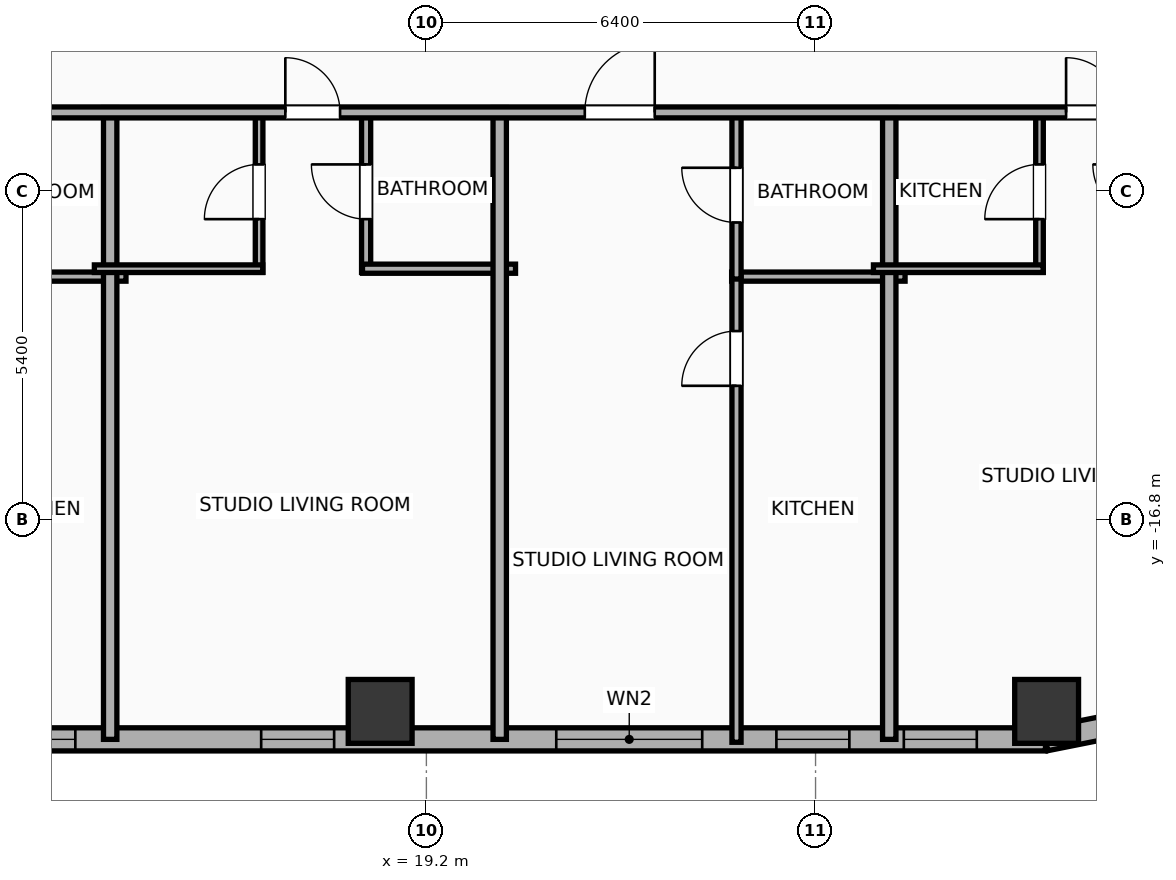
"""IFC4 building model, lengths in metres.
Left out: names, types, materials, properties, quantities, classifications, styles, units other than length and angle.
Written with IfcOpenShell. Run it as: python <this file> out.ifc"""

import sys

from ifc_helpers import new_model, si_unit, direction, frame, frame_2d, origin, origin_2d, place, context, subcontext, project, spatial, rectangle, hollow_rectangle, extrude, element, fill, save


model = new_model("IFC4")
c1 = context("Model", 3, precision=1e-05, world=origin(), true_north=direction((0.0, 1.0)))
c2 = subcontext(c1, "Body", "Model", "MODEL_VIEW")
j1 = project(units=[si_unit("LENGTHUNIT", "METRE"), si_unit("PLANEANGLEUNIT", "RADIAN")], contexts=[c1])
p1 = place(None, origin())
s1 = spatial("IfcSite", under=j1, at=p1, CompositionType="ELEMENT")
p2 = place(p1, origin())
s2 = spatial("IfcBuilding", under=s1, at=p2, CompositionType="ELEMENT")
p3 = place(p2, frame((0.0, 0.0, 124.8)))
s3 = spatial("IfcBuildingStorey", under=s2, at=p3, CompositionType="ELEMENT", Elevation=124.8)
for number, where, z_axis, x_axis in (
    (1, (18.44, -19.95, 0.0), (0.0, 0.0, 1.0), (1.0, 0.0, 0.0)),
    (2, (29.4, -19.95, 0.0), (0.0, 0.0, 1.0), (1.0, 0.0, 0.0)),
):
    element("IfcColumn", number, at=place(p3, frame(where, z_axis=z_axis, x_axis=x_axis)), inside=s3, PredefinedType="COLUMN", context=c2, shape_type="SweptSolid", body=[
        extrude(hollow_rectangle(XDim=1.05, YDim=1.05, WallThickness=0.036, at=origin_2d()), origin(), (0.0, 0.0, 1.0), 3.9),
    ])
p4 = place(p3, frame((29.381, -20.41, 0.0), z_axis=(0.0, 0.0, 1.0), x_axis=(-1.0, 0.0, 0.0)))
e3 = element("IfcWall", 3, at=p4, inside=s3, PredefinedType="ELEMENTEDWALL", context=c2, shape_type="SweptSolid", body=[
    extrude(rectangle(XDim=54.763, YDim=0.38, at=frame_2d((27.381, 0.0))), origin(), (0.0, 0.0, 1.0), 3.65),
])
p5 = place(p4, frame((5.645, 0.0, 0.75)))
e4 = element("IfcOpeningElement", 4, at=p5, cuts=e3, PredefinedType="OPENING", context=c2, shape_type="SweptSolid", body=[
    extrude(rectangle(XDim=2.4, YDim=2.1, at=frame_2d((1.2, 1.05))), frame((0.0, 0.2, 0.0), z_axis=(0.0, -1.0, 0.0), x_axis=(1.0, 0.0, 0.0)), (0.0, 0.0, 1.0), 0.4),
])
p6 = place(p4, frame((18.486, 0.0, 0.75)))
e5 = element("IfcOpeningElement", 5, at=p6, cuts=e3, PredefinedType="OPENING", context=c2, shape_type="SweptSolid", body=[
    extrude(rectangle(XDim=2.4, YDim=2.1, at=frame_2d((1.2, 1.05))), frame((0.0, 0.2, 0.0), z_axis=(0.0, -1.0, 0.0), x_axis=(1.0, 0.0, 0.0)), (0.0, 0.0, 1.0), 0.4),
])
p7 = place(p4, frame((34.677, 0.0, 0.75)))
e6 = element("IfcOpeningElement", 6, at=p7, cuts=e3, PredefinedType="OPENING", context=c2, shape_type="SweptSolid", body=[
    extrude(rectangle(XDim=2.4, YDim=2.1, at=frame_2d((1.2, 1.05))), frame((0.0, 0.2, 0.0), z_axis=(0.0, -1.0, 0.0), x_axis=(1.0, 0.0, 0.0)), (0.0, 0.0, 1.0), 0.4),
])
p8 = place(p4, frame((46.717, 0.0, 0.75)))
e7 = element("IfcOpeningElement", 7, at=p8, cuts=e3, PredefinedType="OPENING", context=c2, shape_type="SweptSolid", body=[
    extrude(rectangle(XDim=2.4, YDim=2.1, at=frame_2d((1.2, 1.05))), frame((0.0, 0.2, 0.0), z_axis=(0.0, -1.0, 0.0), x_axis=(1.0, 0.0, 0.0)), (0.0, 0.0, 1.0), 0.4),
])
p9 = place(p4, frame((52.719, 0.0, 0.75)))
e8 = element("IfcOpeningElement", 8, at=p9, cuts=e3, PredefinedType="OPENING", context=c2, shape_type="SweptSolid", body=[
    extrude(rectangle(XDim=1.2, YDim=2.05, at=frame_2d((0.6, 1.025))), frame((0.0, 0.2, 0.0), z_axis=(0.0, -1.0, 0.0), x_axis=(1.0, 0.0, 0.0)), (0.0, 0.0, 1.0), 0.4),
])
p10 = place(p4, frame((50.786, 0.0, 0.75)))
e9 = element("IfcOpeningElement", 9, at=p10, cuts=e3, PredefinedType="OPENING", context=c2, shape_type="SweptSolid", body=[
    extrude(rectangle(XDim=1.2, YDim=2.05, at=frame_2d((0.6, 1.025))), frame((0.0, 0.2, 0.0), z_axis=(0.0, -1.0, 0.0), x_axis=(1.0, 0.0, 0.0)), (0.0, 0.0, 1.0), 0.4),
])
p11 = place(p4, frame((41.858, 0.0, 0.75)))
e10 = element("IfcOpeningElement", 10, at=p11, cuts=e3, PredefinedType="OPENING", context=c2, shape_type="SweptSolid", body=[
    extrude(rectangle(XDim=1.2, YDim=2.05, at=frame_2d((0.6, 1.025))), frame((0.0, 0.2, 0.0), z_axis=(0.0, -1.0, 0.0), x_axis=(1.0, 0.0, 0.0)), (0.0, 0.0, 1.0), 0.4),
])
p12 = place(p4, frame((38.556, 0.0, 0.75)))
e11 = element("IfcOpeningElement", 11, at=p12, cuts=e3, PredefinedType="OPENING", context=c2, shape_type="SweptSolid", body=[
    extrude(rectangle(XDim=1.2, YDim=2.05, at=frame_2d((0.6, 1.025))), frame((0.0, 0.2, 0.0), z_axis=(0.0, -1.0, 0.0), x_axis=(1.0, 0.0, 0.0)), (0.0, 0.0, 1.0), 0.4),
])
p13 = place(p4, frame((30.406, 0.0, 0.75)))
e12 = element("IfcOpeningElement", 12, at=p13, cuts=e3, PredefinedType="OPENING", context=c2, shape_type="SweptSolid", body=[
    extrude(rectangle(XDim=1.2, YDim=2.05, at=frame_2d((0.6, 1.025))), frame((0.0, 0.2, 0.0), z_axis=(0.0, -1.0, 0.0), x_axis=(1.0, 0.0, 0.0)), (0.0, 0.0, 1.0), 0.4),
])
p14 = place(p4, frame((25.434, 0.0, 0.75)))
e13 = element("IfcOpeningElement", 13, at=p14, cuts=e3, PredefinedType="OPENING", context=c2, shape_type="SweptSolid", body=[
    extrude(rectangle(XDim=1.2, YDim=2.05, at=frame_2d((0.6, 1.025))), frame((0.0, 0.2, 0.0), z_axis=(0.0, -1.0, 0.0), x_axis=(1.0, 0.0, 0.0)), (0.0, 0.0, 1.0), 0.4),
])
p15 = place(p4, frame((22.669, 0.0, 0.75)))
e14 = element("IfcOpeningElement", 14, at=p15, cuts=e3, PredefinedType="OPENING", context=c2, shape_type="SweptSolid", body=[
    extrude(rectangle(XDim=1.2, YDim=2.05, at=frame_2d((0.6, 1.025))), frame((0.0, 0.2, 0.0), z_axis=(0.0, -1.0, 0.0), x_axis=(1.0, 0.0, 0.0)), (0.0, 0.0, 1.0), 0.4),
])
p16 = place(p4, frame((15.954, 0.0, 0.75)))
e15 = element("IfcOpeningElement", 15, at=p16, cuts=e3, PredefinedType="OPENING", context=c2, shape_type="SweptSolid", body=[
    extrude(rectangle(XDim=1.2, YDim=2.05, at=frame_2d((0.6, 1.025))), frame((0.0, 0.2, 0.0), z_axis=(0.0, -1.0, 0.0), x_axis=(1.0, 0.0, 0.0)), (0.0, 0.0, 1.0), 0.4),
])
p17 = place(p4, frame((11.698, 0.0, 0.75)))
e16 = element("IfcOpeningElement", 16, at=p17, cuts=e3, PredefinedType="OPENING", context=c2, shape_type="SweptSolid", body=[
    extrude(rectangle(XDim=1.2, YDim=2.05, at=frame_2d((0.6, 1.025))), frame((0.0, 0.2, 0.0), z_axis=(0.0, -1.0, 0.0), x_axis=(1.0, 0.0, 0.0)), (0.0, 0.0, 1.0), 0.4),
])
p18 = place(p4, frame((3.225, 0.0, 0.75)))
e17 = element("IfcOpeningElement", 17, at=p18, cuts=e3, PredefinedType="OPENING", context=c2, shape_type="SweptSolid", body=[
    extrude(rectangle(XDim=1.2, YDim=2.05, at=frame_2d((0.6, 1.025))), frame((0.0, 0.2, 0.0), z_axis=(0.0, -1.0, 0.0), x_axis=(1.0, 0.0, 0.0)), (0.0, 0.0, 1.0), 0.4),
])
p19 = place(p4, frame((1.13, 0.0, 0.75)))
e18 = element("IfcOpeningElement", 18, at=p19, cuts=e3, PredefinedType="OPENING", context=c2, shape_type="SweptSolid", body=[
    extrude(rectangle(XDim=1.2, YDim=2.05, at=frame_2d((0.6, 1.025))), frame((0.0, 0.2, 0.0), z_axis=(0.0, -1.0, 0.0), x_axis=(1.0, 0.0, 0.0)), (0.0, 0.0, 1.0), 0.4),
])
p20 = place(p3, frame((30.857, -20.116, 0.0), z_axis=(0.0, 0.0, 1.0), x_axis=(-0.980786132421, -0.195086038585, 0.0)))
e19 = element("IfcWall", 19, at=p20, inside=s3, PredefinedType="ELEMENTEDWALL", context=c2, shape_type="SweptSolid", body=[
    extrude(rectangle(XDim=1.504, YDim=0.38, at=frame_2d((0.752, 0.0))), origin(), (0.0, 0.0, 1.0), 3.65),
])
p21 = place(p3, frame((11.574, -12.8, 0.0), z_axis=(0.0, 0.0, 1.0), x_axis=(1.0, 0.0, 0.0)))
e20 = element("IfcWall", 20, at=p21, inside=s3, PredefinedType="PLUMBINGWALL", context=c2, shape_type="SweptSolid", body=[
    extrude(rectangle(XDim=2.686, YDim=0.15, at=frame_2d((1.343, 0.0))), origin(), (0.0, 0.0, 1.0), 3.65),
])
p22 = place(p3, frame((14.0, -20.41, 0.0), z_axis=(0.0, 0.0, 1.0), x_axis=(0.0, 1.0, 0.0)))
e21 = element("IfcWall", 21, at=p22, inside=s3, PredefinedType="PARTITIONING", context=c2, shape_type="SweptSolid", body=[
    extrude(rectangle(XDim=10.39, YDim=0.22, at=frame_2d((5.195, 0.0))), origin(), (0.0, 0.0, 1.0), 3.65),
])
p23 = place(p3, frame((16.449, -12.73, 0.0), z_axis=(0.0, 0.0, 1.0), x_axis=(0.0, 1.0, 0.0)))
e22 = element("IfcWall", 22, at=p23, inside=s3, PredefinedType="PARTITIONING", context=c2, shape_type="SweptSolid", body=[
    extrude(rectangle(XDim=2.65, YDim=0.125, at=frame_2d((1.325, 0.0))), origin(), (0.0, 0.0, 1.0), 3.65),
])
p24 = place(p23, frame((0.875, 0.0, 0.0)))
e23 = element("IfcOpeningElement", 23, at=p24, cuts=e22, PredefinedType="OPENING", context=c2, shape_type="SweptSolid", body=[
    extrude(rectangle(XDim=0.9, YDim=2.05, at=frame_2d((0.45, 1.025))), frame((0.0, 0.073, 0.0), z_axis=(0.0, -1.0, 0.0), x_axis=(1.0, 0.0, 0.0)), (0.0, 0.0, 1.0), 0.145),
])
p25 = place(p3, frame((18.209, -12.73, 0.0), z_axis=(0.0, 0.0, 1.0), x_axis=(0.0, 1.0, 0.0)))
e24 = element("IfcWall", 24, at=p25, inside=s3, PredefinedType="PLUMBINGWALL", context=c2, shape_type="SweptSolid", body=[
    extrude(rectangle(XDim=2.65, YDim=0.15, at=frame_2d((1.325, 0.0))), origin(), (0.0, 0.0, 1.0), 3.65),
])
p26 = place(p25, frame((0.875, 0.0, 0.0)))
e25 = element("IfcOpeningElement", 25, at=p26, cuts=e24, PredefinedType="OPENING", context=c2, shape_type="SweptSolid", body=[
    extrude(rectangle(XDim=0.9, YDim=2.05, at=frame_2d((0.45, 1.025))), frame((0.0, 0.085, 0.0), z_axis=(0.0, -1.0, 0.0), x_axis=(1.0, 0.0, 0.0)), (0.0, 0.0, 1.0), 0.17),
])
p27 = place(p3, frame((13.74, -12.67, 0.0), z_axis=(0.0, 0.0, 1.0), x_axis=(1.0, 0.0, 0.0)))
e26 = element("IfcWall", 26, at=p27, inside=s3, PredefinedType="PARTITIONING", context=c2, shape_type="SweptSolid", body=[
    extrude(rectangle(XDim=2.769, YDim=0.125, at=frame_2d((1.385, 0.0))), origin(), (0.0, 0.0, 1.0), 3.65),
])
p28 = place(p3, frame((18.149, -12.67, 0.0), z_axis=(0.0, 0.0, 1.0), x_axis=(1.0, 0.0, 0.0)))
e27 = element("IfcWall", 27, at=p28, inside=s3, PredefinedType="PLUMBINGWALL", context=c2, shape_type="SweptSolid", body=[
    extrude(rectangle(XDim=2.517, YDim=0.15, at=frame_2d((1.259, 0.0))), origin(), (0.0, 0.0, 1.0), 3.65),
])
p29 = place(p3, frame((20.406, -20.41, 0.0), z_axis=(0.0, 0.0, 1.0), x_axis=(0.0, 1.0, 0.0)))
e28 = element("IfcWall", 28, at=p29, inside=s3, PredefinedType="PARTITIONING", context=c2, shape_type="SweptSolid", body=[
    extrude(rectangle(XDim=10.39, YDim=0.22, at=frame_2d((5.195, 0.0))), origin(), (0.0, 0.0, 1.0), 3.65),
])
p30 = place(p3, frame((24.22, -12.8, 0.0), z_axis=(0.0, 0.0, 1.0), x_axis=(1.0, 0.0, 0.0)))
e29 = element("IfcWall", 29, at=p30, inside=s3, PredefinedType="PLUMBINGWALL", context=c2, shape_type="SweptSolid", body=[
    extrude(rectangle(XDim=2.852, YDim=0.15, at=frame_2d((1.426, 0.0))), origin(), (0.0, 0.0, 1.0), 3.65),
])
p31 = place(p3, frame((24.3, -20.458, 0.0), z_axis=(0.0, 0.0, 1.0), x_axis=(0.0, 1.0, 0.0)))
e30 = element("IfcWall", 30, at=p31, inside=s3, PredefinedType="PLUMBINGWALL", context=c2, shape_type="SweptSolid", body=[
    extrude(rectangle(XDim=7.698, YDim=0.15, at=frame_2d((3.849, 0.0))), origin(), (0.0, 0.0, 1.0), 3.65),
])
p32 = place(p31, frame((5.862, 0.0, 0.0)))
e31 = element("IfcOpeningElement", 31, at=p32, cuts=e30, PredefinedType="OPENING", context=c2, shape_type="SweptSolid", body=[
    extrude(rectangle(XDim=0.9, YDim=2.05, at=frame_2d((0.45, 1.025))), frame((0.0, 0.085, 0.0), z_axis=(0.0, -1.0, 0.0), x_axis=(1.0, 0.0, 0.0)), (0.0, 0.0, 1.0), 0.17),
])
p33 = place(p3, frame((24.3, -12.84, 0.0), z_axis=(0.0, 0.0, 1.0), x_axis=(0.0, 1.0, 0.0)))
e32 = element("IfcWall", 32, at=p33, inside=s3, PredefinedType="PLUMBINGWALL", context=c2, shape_type="SweptSolid", body=[
    extrude(rectangle(XDim=2.76, YDim=0.15, at=frame_2d((1.38, 0.0))), origin(), (0.0, 0.0, 1.0), 3.65),
])
p34 = place(p33, frame((0.93, 0.0, 0.0)))
e33 = element("IfcOpeningElement", 33, at=p34, cuts=e32, PredefinedType="OPENING", context=c2, shape_type="SweptSolid", body=[
    extrude(rectangle(XDim=0.9, YDim=2.05, at=frame_2d((0.45, 1.025))), frame((0.0, 0.085, 0.0), z_axis=(0.0, -1.0, 0.0), x_axis=(1.0, 0.0, 0.0)), (0.0, 0.0, 1.0), 0.17),
])
p35 = place(p3, frame((26.812, -20.41, 0.0), z_axis=(0.0, 0.0, 1.0), x_axis=(0.0, 1.0, 0.0)))
e34 = element("IfcWall", 34, at=p35, inside=s3, PredefinedType="PARTITIONING", context=c2, shape_type="SweptSolid", body=[
    extrude(rectangle(XDim=10.39, YDim=0.22, at=frame_2d((5.195, 0.0))), origin(), (0.0, 0.0, 1.0), 3.65),
])
p36 = place(p3, frame((29.283, -12.73, 0.0), z_axis=(0.0, 0.0, 1.0), x_axis=(0.0, 1.0, 0.0)))
e35 = element("IfcWall", 35, at=p36, inside=s3, PredefinedType="PARTITIONING", context=c2, shape_type="SweptSolid", body=[
    extrude(rectangle(XDim=2.65, YDim=0.125, at=frame_2d((1.325, 0.0))), origin(), (0.0, 0.0, 1.0), 3.65),
])
p37 = place(p36, frame((0.875, 0.0, 0.0)))
e36 = element("IfcOpeningElement", 36, at=p37, cuts=e35, PredefinedType="OPENING", context=c2, shape_type="SweptSolid", body=[
    extrude(rectangle(XDim=0.9, YDim=2.05, at=frame_2d((0.45, 1.025))), frame((0.0, 0.073, 0.0), z_axis=(0.0, -1.0, 0.0), x_axis=(1.0, 0.0, 0.0)), (0.0, 0.0, 1.0), 0.145),
])
p38 = place(p3, frame((26.552, -12.67, 0.0), z_axis=(0.0, 0.0, 1.0), x_axis=(1.0, 0.0, 0.0)))
e37 = element("IfcWall", 37, at=p38, inside=s3, PredefinedType="PARTITIONING", context=c2, shape_type="SweptSolid", body=[
    extrude(rectangle(XDim=2.791, YDim=0.125, at=frame_2d((1.396, 0.0))), origin(), (0.0, 0.0, 1.0), 3.65),
])
p39 = place(p3, frame((-29.21, -10.1, 0.0), z_axis=(0.0, 0.0, 1.0), x_axis=(1.0, 0.0, 0.0)))
e38 = element("IfcWall", 38, at=p39, inside=s3, PredefinedType="PARTITIONING", context=c2, shape_type="SweptSolid", body=[
    extrude(rectangle(XDim=62.42, YDim=0.18, at=frame_2d((31.21, 0.0))), origin(), (0.0, 0.0, 1.0), 3.65),
])
p40 = place(p39, frame((2.671, 0.0, 0.0)))
e39 = element("IfcOpeningElement", 39, at=p40, cuts=e38, PredefinedType="OPENING", context=c2, shape_type="SweptSolid", body=[
    extrude(rectangle(XDim=0.9, YDim=2.05, at=frame_2d((0.45, 1.025))), frame((0.0, 0.1, 0.0), z_axis=(0.0, -1.0, 0.0), x_axis=(1.0, 0.0, 0.0)), (0.0, 0.0, 1.0), 0.2),
])
p41 = place(p39, frame((9.637, 0.0, 0.0)))
e40 = element("IfcOpeningElement", 40, at=p41, cuts=e38, PredefinedType="OPENING", context=c2, shape_type="SweptSolid", body=[
    extrude(rectangle(XDim=1.15, YDim=2.05, at=frame_2d((0.575, 1.025))), frame((0.0, 0.1, 0.0), z_axis=(0.0, -1.0, 0.0), x_axis=(1.0, 0.0, 0.0)), (0.0, 0.0, 1.0), 0.2),
])
p42 = place(p39, frame((14.843, 0.0, 0.0)))
e41 = element("IfcOpeningElement", 41, at=p42, cuts=e38, PredefinedType="OPENING", context=c2, shape_type="SweptSolid", body=[
    extrude(rectangle(XDim=0.9, YDim=2.05, at=frame_2d((0.45, 1.025))), frame((0.0, 0.1, 0.0), z_axis=(0.0, -1.0, 0.0), x_axis=(1.0, 0.0, 0.0)), (0.0, 0.0, 1.0), 0.2),
])
p43 = place(p39, frame((21.958, 0.0, 0.0)))
e42 = element("IfcOpeningElement", 42, at=p43, cuts=e38, PredefinedType="OPENING", context=c2, shape_type="SweptSolid", body=[
    extrude(rectangle(XDim=1.15, YDim=2.05, at=frame_2d((0.575, 1.025))), frame((0.0, 0.1, 0.0), z_axis=(0.0, -1.0, 0.0), x_axis=(1.0, 0.0, 0.0)), (0.0, 0.0, 1.0), 0.2),
])
p44 = place(p39, frame((27.258, 0.0, 0.0)))
e43 = element("IfcOpeningElement", 43, at=p44, cuts=e38, PredefinedType="OPENING", context=c2, shape_type="SweptSolid", body=[
    extrude(rectangle(XDim=0.9, YDim=2.05, at=frame_2d((0.45, 1.025))), frame((0.0, 0.1, 0.0), z_axis=(0.0, -1.0, 0.0), x_axis=(1.0, 0.0, 0.0)), (0.0, 0.0, 1.0), 0.2),
])
p45 = place(p39, frame((32.014, 0.0, 0.0)))
e44 = element("IfcOpeningElement", 44, at=p45, cuts=e38, PredefinedType="OPENING", context=c2, shape_type="SweptSolid", body=[
    extrude(rectangle(XDim=1.15, YDim=2.05, at=frame_2d((0.575, 1.025))), frame((0.0, 0.1, 0.0), z_axis=(0.0, -1.0, 0.0), x_axis=(1.0, 0.0, 0.0)), (0.0, 0.0, 1.0), 0.2),
])
p46 = place(p39, frame((38.369, 0.0, 0.0)))
e45 = element("IfcOpeningElement", 45, at=p46, cuts=e38, PredefinedType="OPENING", context=c2, shape_type="SweptSolid", body=[
    extrude(rectangle(XDim=1.15, YDim=2.05, at=frame_2d((0.575, 1.025))), frame((0.0, 0.1, 0.0), z_axis=(0.0, -1.0, 0.0), x_axis=(1.0, 0.0, 0.0)), (0.0, 0.0, 1.0), 0.2),
])
p47 = place(p39, frame((46.09, 0.0, 0.0)))
e46 = element("IfcOpeningElement", 46, at=p47, cuts=e38, PredefinedType="OPENING", context=c2, shape_type="SweptSolid", body=[
    extrude(rectangle(XDim=0.9, YDim=2.05, at=frame_2d((0.45, 1.025))), frame((0.0, 0.1, 0.0), z_axis=(0.0, -1.0, 0.0), x_axis=(1.0, 0.0, 0.0)), (0.0, 0.0, 1.0), 0.2),
])
p48 = place(p39, frame((51.015, 0.0, 0.0)))
e47 = element("IfcOpeningElement", 47, at=p48, cuts=e38, PredefinedType="OPENING", context=c2, shape_type="SweptSolid", body=[
    extrude(rectangle(XDim=1.15, YDim=2.05, at=frame_2d((0.575, 1.025))), frame((0.0, 0.1, 0.0), z_axis=(0.0, -1.0, 0.0), x_axis=(1.0, 0.0, 0.0)), (0.0, 0.0, 1.0), 0.2),
])
p49 = place(p39, frame((58.93, 0.0, 0.0)))
e48 = element("IfcOpeningElement", 48, at=p49, cuts=e38, PredefinedType="OPENING", context=c2, shape_type="SweptSolid", body=[
    extrude(rectangle(XDim=0.9, YDim=2.05, at=frame_2d((0.45, 1.025))), frame((0.0, 0.1, 0.0), z_axis=(0.0, -1.0, 0.0), x_axis=(1.0, 0.0, 0.0)), (0.0, 0.0, 1.0), 0.2),
])
p50 = place(p5, origin())
e49 = element("IfcWindow", 49, at=p50, inside=s3, PartitioningType="SINGLE_PANEL", PredefinedType="WINDOW", context=c2, shape_type="SweptSolid", body=[
    extrude(rectangle(XDim=2.4, YDim=2.1, at=frame_2d((1.2, 1.05))), frame((0.0, 0.03, 0.0), z_axis=(0.0, -1.0, 0.0), x_axis=(1.0, 0.0, 0.0)), (0.0, 0.0, 1.0), 0.06),
])
fill(e4, e49)
p51 = place(p16, origin())
e50 = element("IfcWindow", 50, at=p51, inside=s3, PartitioningType="SINGLE_PANEL", PredefinedType="WINDOW", context=c2, shape_type="SweptSolid", body=[
    extrude(rectangle(XDim=1.2, YDim=2.05, at=frame_2d((0.6, 1.025))), frame((0.0, 0.03, 0.0), z_axis=(0.0, -1.0, 0.0), x_axis=(1.0, 0.0, 0.0)), (0.0, 0.0, 1.0), 0.06),
])
fill(e15, e50)
p52 = place(p17, origin())
e51 = element("IfcWindow", 51, at=p52, inside=s3, PartitioningType="SINGLE_PANEL", PredefinedType="WINDOW", context=c2, shape_type="SweptSolid", body=[
    extrude(rectangle(XDim=1.2, YDim=2.05, at=frame_2d((0.6, 1.025))), frame((0.0, 0.03, 0.0), z_axis=(0.0, -1.0, 0.0), x_axis=(1.0, 0.0, 0.0)), (0.0, 0.0, 1.0), 0.06),
])
fill(e16, e51)
p53 = place(p18, origin())
e52 = element("IfcWindow", 52, at=p53, inside=s3, PartitioningType="SINGLE_PANEL", PredefinedType="WINDOW", context=c2, shape_type="SweptSolid", body=[
    extrude(rectangle(XDim=1.2, YDim=2.05, at=frame_2d((0.6, 1.025))), frame((0.0, 0.03, 0.0), z_axis=(0.0, -1.0, 0.0), x_axis=(1.0, 0.0, 0.0)), (0.0, 0.0, 1.0), 0.06),
])
fill(e17, e52)
p54 = place(p19, origin())
e53 = element("IfcWindow", 53, at=p54, inside=s3, PartitioningType="SINGLE_PANEL", PredefinedType="WINDOW", context=c2, shape_type="SweptSolid", body=[
    extrude(rectangle(XDim=1.2, YDim=2.05, at=frame_2d((0.6, 1.025))), frame((0.0, 0.03, 0.0), z_axis=(0.0, -1.0, 0.0), x_axis=(1.0, 0.0, 0.0)), (0.0, 0.0, 1.0), 0.06),
])
fill(e18, e53)
p55 = place(p24, origin())
e54 = element("IfcDoor", 54, at=p55, inside=s3, OperationType="SINGLE_SWING_LEFT", PredefinedType="DOOR", context=c2, shape_type="SweptSolid", body=[
    extrude(rectangle(XDim=0.9, YDim=2.05, at=frame_2d((0.45, 1.025))), frame((0.0, 0.025, 0.0), z_axis=(0.0, -1.0, 0.0), x_axis=(1.0, 0.0, 0.0)), (0.0, 0.0, 1.0), 0.05),
])
fill(e23, e54)
p56 = place(p26, origin())
e55 = element("IfcDoor", 55, at=p56, inside=s3, OperationType="SINGLE_SWING_RIGHT", PredefinedType="DOOR", context=c2, shape_type="SweptSolid", body=[
    extrude(rectangle(XDim=0.9, YDim=2.05, at=frame_2d((0.45, 1.025))), frame((0.0, 0.025, 0.0), z_axis=(0.0, -1.0, 0.0), x_axis=(1.0, 0.0, 0.0)), (0.0, 0.0, 1.0), 0.05),
])
fill(e25, e55)
p57 = place(p32, origin())
e56 = element("IfcDoor", 56, at=p57, inside=s3, OperationType="SINGLE_SWING_LEFT", PredefinedType="DOOR", context=c2, shape_type="SweptSolid", body=[
    extrude(rectangle(XDim=0.9, YDim=2.05, at=frame_2d((0.45, 1.025))), frame((0.0, 0.025, 0.0), z_axis=(0.0, -1.0, 0.0), x_axis=(1.0, 0.0, 0.0)), (0.0, 0.0, 1.0), 0.05),
])
fill(e31, e56)
p58 = place(p34, origin())
e57 = element("IfcDoor", 57, at=p58, inside=s3, OperationType="SINGLE_SWING_RIGHT", PredefinedType="DOOR", context=c2, shape_type="SweptSolid", body=[
    extrude(rectangle(XDim=0.9, YDim=2.05, at=frame_2d((0.45, 1.025))), frame((0.0, 0.025, 0.0), z_axis=(0.0, -1.0, 0.0), x_axis=(1.0, 0.0, 0.0)), (0.0, 0.0, 1.0), 0.05),
])
fill(e33, e57)
p59 = place(p37, origin())
e58 = element("IfcDoor", 58, at=p59, inside=s3, OperationType="SINGLE_SWING_LEFT", PredefinedType="DOOR", context=c2, shape_type="SweptSolid", body=[
    extrude(rectangle(XDim=0.9, YDim=2.05, at=frame_2d((0.45, 1.025))), frame((0.0, 0.025, 0.0), z_axis=(0.0, -1.0, 0.0), x_axis=(1.0, 0.0, 0.0)), (0.0, 0.0, 1.0), 0.05),
])
fill(e36, e58)
p60 = place(p47, origin())
e59 = element("IfcDoor", 59, at=p60, inside=s3, OperationType="SINGLE_SWING_LEFT", PredefinedType="DOOR", context=c2, shape_type="SweptSolid", body=[
    extrude(rectangle(XDim=0.9, YDim=2.05, at=frame_2d((0.45, 1.025))), frame((0.0, 0.025, 0.0), z_axis=(0.0, -1.0, 0.0), x_axis=(1.0, 0.0, 0.0)), (0.0, 0.0, 1.0), 0.05),
])
fill(e46, e59)
p61 = place(p48, origin())
e60 = element("IfcDoor", 60, at=p61, inside=s3, OperationType="SINGLE_SWING_RIGHT", PredefinedType="DOOR", context=c2, shape_type="SweptSolid", body=[
    extrude(rectangle(XDim=1.15, YDim=2.05, at=frame_2d((0.575, 1.025))), frame((0.0, 0.025, 0.0), z_axis=(0.0, -1.0, 0.0), x_axis=(1.0, 0.0, 0.0)), (0.0, 0.0, 1.0), 0.05),
])
fill(e47, e60)
p62 = place(p49, origin())
e61 = element("IfcDoor", 61, at=p62, inside=s3, OperationType="SINGLE_SWING_LEFT", PredefinedType="DOOR", context=c2, shape_type="SweptSolid", body=[
    extrude(rectangle(XDim=0.9, YDim=2.05, at=frame_2d((0.45, 1.025))), frame((0.0, 0.025, 0.0), z_axis=(0.0, -1.0, 0.0), x_axis=(1.0, 0.0, 0.0)), (0.0, 0.0, 1.0), 0.05),
])
fill(e48, e61)
save(model, sys.argv[1])
